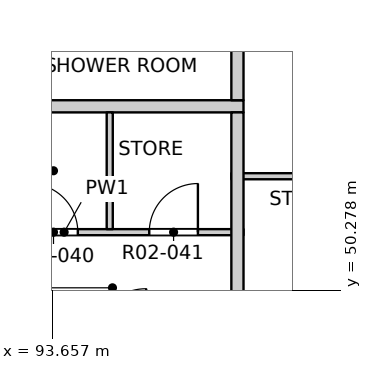
"""IFC4 building model, lengths in metres.
Left out: names, types, materials, properties, quantities, classifications, styles, units other than length and angle.
Written with IfcOpenShell. Run it as: python <this file> out.ifc"""

import sys

from ifc_helpers import new_model, si_unit, direction, frame, frame_2d, origin, place, context, subcontext, project, spatial, rectangle, extrude, element, fill, save


model = new_model("IFC4")
c1 = context("Model", 3, precision=1e-05, world=origin(), true_north=direction((0.0, 1.0)))
c2 = subcontext(c1, "Body", "Model", "MODEL_VIEW")
j1 = project(units=[si_unit("LENGTHUNIT", "METRE"), si_unit("PLANEANGLEUNIT", "RADIAN")], contexts=[c1])
p1 = place(None, origin())
s1 = spatial("IfcSite", under=j1, at=p1, CompositionType="ELEMENT")
p2 = place(p1, origin())
s2 = spatial("IfcBuilding", under=s1, at=p2, CompositionType="ELEMENT")
p3 = place(p2, frame((0.0, 0.0, 29.7)))
s3 = spatial("IfcBuildingStorey", under=s2, at=p3, CompositionType="ELEMENT", Elevation=29.7)
p4 = place(p3, frame((90.9, 51.23, 0.0), z_axis=(0.0, 0.0, 1.0), x_axis=(1.0, 0.0, 0.0)))
e1 = element("IfcWall", 1, at=p4, inside=s3, PredefinedType="PARTITIONING", context=c2, shape_type="SweptSolid", body=[
    extrude(rectangle(XDim=5.9, YDim=0.1, at=frame_2d((2.95, 0.0))), origin(), (0.0, 0.0, 1.0), 3.15),
])
p5 = place(p4, frame((0.5, 0.0, 0.0)))
e2 = element("IfcOpeningElement", 2, at=p5, cuts=e1, PredefinedType="OPENING", context=c2, shape_type="SweptSolid", body=[
    extrude(rectangle(XDim=0.9, YDim=2.1, at=frame_2d((0.45, 1.05))), frame((0.0, 0.06, 0.0), z_axis=(0.0, -1.0, 0.0), x_axis=(1.0, 0.0, 0.0)), (0.0, 0.0, 1.0), 0.12),
])
p6 = place(p4, frame((2.375, 0.0, 0.0)))
e3 = element("IfcOpeningElement", 3, at=p6, cuts=e1, PredefinedType="OPENING", context=c2, shape_type="SweptSolid", body=[
    extrude(rectangle(XDim=0.8, YDim=2.1, at=frame_2d((0.4, 1.05))), frame((0.0, 0.06, 0.0), z_axis=(0.0, -1.0, 0.0), x_axis=(1.0, 0.0, 0.0)), (0.0, 0.0, 1.0), 0.12),
])
p7 = place(p4, frame((4.35, 0.0, 0.0)))
e4 = element("IfcOpeningElement", 4, at=p7, cuts=e1, PredefinedType="OPENING", context=c2, shape_type="SweptSolid", body=[
    extrude(rectangle(XDim=0.8, YDim=2.1, at=frame_2d((0.4, 1.05))), frame((0.0, 0.06, 0.0), z_axis=(0.0, -1.0, 0.0), x_axis=(1.0, 0.0, 0.0)), (0.0, 0.0, 1.0), 0.12),
])
p8 = place(p3, frame((96.6, 52.15, 0.0), z_axis=(0.0, 0.0, 1.0), x_axis=(1.0, 0.0, 0.0)))
e5 = element("IfcWall", 5, at=p8, inside=s3, PredefinedType="PARTITIONING", context=c2, shape_type="SweptSolid", body=[
    extrude(rectangle(XDim=2.22, YDim=0.1, at=frame_2d((1.11, 0.0))), origin(), (0.0, 0.0, 1.0), 3.15),
])
p9 = place(p3, frame((73.2, 53.3, 0.0), z_axis=(0.0, 0.0, 1.0), x_axis=(1.0, 0.0, 0.0)))
e6 = element("IfcWall", 6, at=p9, inside=s3, PredefinedType="PARTITIONING", context=c2, shape_type="SweptSolid", body=[
    extrude(rectangle(XDim=23.6, YDim=0.2, at=frame_2d((11.8, 0.0))), origin(), (0.0, 0.0, 1.0), 3.15),
])
p10 = place(p9, frame((5.925, 0.0, 0.0)))
e7 = element("IfcOpeningElement", 7, at=p10, cuts=e6, PredefinedType="OPENING", context=c2, shape_type="SweptSolid", body=[
    extrude(rectangle(XDim=1.0, YDim=2.1, at=frame_2d((0.5, 1.05))), frame((0.0, 0.11, 0.0), z_axis=(0.0, -1.0, 0.0), x_axis=(1.0, 0.0, 0.0)), (0.0, 0.0, 1.0), 0.22),
])
p11 = place(p9, frame((17.925, 0.0, 0.0)))
e8 = element("IfcOpeningElement", 8, at=p11, cuts=e6, PredefinedType="OPENING", context=c2, shape_type="SweptSolid", body=[
    extrude(rectangle(XDim=1.0, YDim=2.1, at=frame_2d((0.5, 1.05))), frame((0.0, 0.11, 0.0), z_axis=(0.0, -1.0, 0.0), x_axis=(1.0, 0.0, 0.0)), (0.0, 0.0, 1.0), 0.22),
])
p12 = place(p3, frame((94.6, 51.28, 0.0), z_axis=(0.0, 0.0, 1.0), x_axis=(0.0, 1.0, 0.0)))
e9 = element("IfcWall", 9, at=p12, inside=s3, PredefinedType="PARTITIONING", context=c2, shape_type="SweptSolid", body=[
    extrude(rectangle(XDim=1.92, YDim=0.1, at=frame_2d((0.96, 0.0))), origin(), (0.0, 0.0, 1.0), 3.15),
])
p13 = place(p3, frame((96.7, 41.9, 0.0), z_axis=(0.0, 0.0, 1.0), x_axis=(0.0, 1.0, 0.0)))
e10 = element("IfcWall", 10, at=p13, inside=s3, PredefinedType="PARTITIONING", context=c2, shape_type="SweptSolid", body=[
    extrude(rectangle(XDim=11.3, YDim=0.2, at=frame_2d((5.65, 0.0))), origin(), (0.0, 0.0, 1.0), 3.15),
])
p14 = place(p3, frame((96.7, 53.4, 0.0), z_axis=(0.0, 0.0, 1.0), x_axis=(0.0, 1.0, 0.0)))
e11 = element("IfcWall", 11, at=p14, inside=s3, PredefinedType="PARTITIONING", context=c2, shape_type="SweptSolid", body=[
    extrude(rectangle(XDim=31.0, YDim=0.2, at=frame_2d((15.5, 0.0))), origin(), (0.0, 0.0, 1.0), 3.15),
])
p15 = place(p14, frame((2.425, 0.0, 0.0)))
e12 = element("IfcOpeningElement", 12, at=p15, cuts=e11, PredefinedType="OPENING", context=c2, shape_type="SweptSolid", body=[
    extrude(rectangle(XDim=1.0, YDim=2.1, at=frame_2d((0.5, 1.05))), frame((0.0, 0.11, 0.0), z_axis=(0.0, -1.0, 0.0), x_axis=(1.0, 0.0, 0.0)), (0.0, 0.0, 1.0), 0.22),
])
p16 = place(p14, frame((13.375, 0.0, 0.0)))
e13 = element("IfcOpeningElement", 13, at=p16, cuts=e11, PredefinedType="OPENING", context=c2, shape_type="SweptSolid", body=[
    extrude(rectangle(XDim=1.0, YDim=2.1, at=frame_2d((0.5, 1.05))), frame((0.0, 0.11, 0.0), z_axis=(0.0, -1.0, 0.0), x_axis=(1.0, 0.0, 0.0)), (0.0, 0.0, 1.0), 0.22),
])
p17 = place(p14, frame((29.525, 0.0, 0.0)))
e14 = element("IfcOpeningElement", 14, at=p17, cuts=e11, PredefinedType="OPENING", context=c2, shape_type="SweptSolid", body=[
    extrude(rectangle(XDim=1.0, YDim=2.1, at=frame_2d((0.5, 1.05))), frame((0.0, 0.11, 0.0), z_axis=(0.0, -1.0, 0.0), x_axis=(1.0, 0.0, 0.0)), (0.0, 0.0, 1.0), 0.22),
])
p18 = place(p6, origin())
e15 = element("IfcDoor", 15, at=p18, inside=s3, OperationType="SINGLE_SWING_LEFT", PredefinedType="DOOR", context=c2, shape_type="SweptSolid", body=[
    extrude(rectangle(XDim=0.8, YDim=2.1, at=frame_2d((0.4, 1.05))), frame((0.0, 0.025, 0.0), z_axis=(0.0, -1.0, 0.0), x_axis=(1.0, 0.0, 0.0)), (0.0, 0.0, 1.0), 0.05),
])
fill(e3, e15)
p19 = place(p7, origin())
e16 = element("IfcDoor", 16, at=p19, inside=s3, OperationType="SINGLE_SWING_RIGHT", PredefinedType="DOOR", context=c2, shape_type="SweptSolid", body=[
    extrude(rectangle(XDim=0.8, YDim=2.1, at=frame_2d((0.4, 1.05))), frame((0.0, 0.025, 0.0), z_axis=(0.0, -1.0, 0.0), x_axis=(1.0, 0.0, 0.0)), (0.0, 0.0, 1.0), 0.05),
])
fill(e4, e16)
save(model, sys.argv[1])
